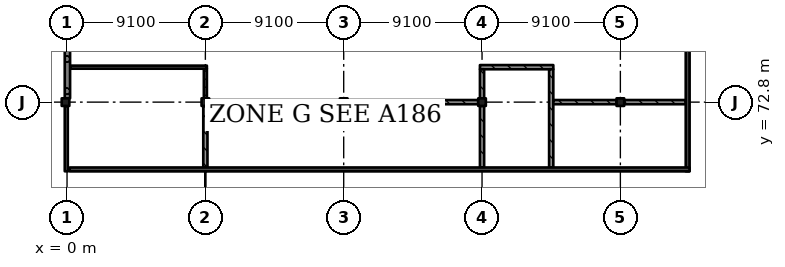
"""IFC4 building model, lengths in metres.
Left out: names, types, materials, properties, quantities, classifications, styles, units other than length and angle.
Written with IfcOpenShell. Run it as: python <this file> out.ifc"""

import sys

from ifc_helpers import new_model, si_unit, direction, frame, frame_2d, origin, origin_2d, place, context, subcontext, project, spatial, rectangle, extrude, element, fill, save


model = new_model("IFC4")
c1 = context("Model", 3, precision=1e-05, world=origin(), true_north=direction((0.0, 1.0)))
c2 = subcontext(c1, "Body", "Model", "MODEL_VIEW")
j1 = project(units=[si_unit("LENGTHUNIT", "METRE"), si_unit("PLANEANGLEUNIT", "RADIAN")], contexts=[c1])
p1 = place(None, origin())
s1 = spatial("IfcSite", under=j1, at=p1, CompositionType="ELEMENT")
p2 = place(p1, origin())
s2 = spatial("IfcBuilding", under=s1, at=p2, CompositionType="ELEMENT")
p3 = place(p2, frame((0.0, 0.0, 29.12)))
s3 = spatial("IfcBuildingStorey", under=s2, at=p3, CompositionType="ELEMENT", Elevation=29.12)
for number, where, z_axis, x_axis in (
    (1, (-0.1, 72.8, 0.0), (0.0, 0.0, 1.0), (1.0, 0.0, 0.0)),
    (2, (9.1, 72.8, 0.0), (0.0, 0.0, 1.0), (1.0, 0.0, 0.0)),
    (3, (18.2, 72.8, 0.0), (0.0, 0.0, 1.0), (1.0, 0.0, 0.0)),
    (4, (27.3, 72.8, 0.0), (0.0, 0.0, 1.0), (1.0, 0.0, 0.0)),
    (5, (36.4, 72.8, 0.0), (0.0, 0.0, 1.0), (1.0, 0.0, 0.0)),
):
    element("IfcColumn", number, at=place(p3, frame(where, z_axis=z_axis, x_axis=x_axis)), inside=s3, PredefinedType="COLUMN", context=c2, shape_type="SweptSolid", body=[
        extrude(rectangle(XDim=0.5, YDim=0.5, at=origin_2d()), origin(), (0.0, 0.0, 1.0), 4.55),
    ])
for number, where, z_axis, x_axis in (
    (6, (40.825, 68.25, 0.0), (0.0, 0.0, 1.0), (0.0, 1.0, 0.0)),
    (7, (40.95, 68.375, 0.0), (0.0, 0.0, 1.0), (-1.0, 0.0, 0.0)),
):
    element("IfcWall", number, at=place(p3, frame(where, z_axis=z_axis, x_axis=x_axis)), inside=s3, PredefinedType="SHEAR", context=c2, shape_type="SweptSolid", body=[
        extrude(rectangle(XDim=40.775, YDim=0.25, at=frame_2d((20.387, 0.0))), origin(), (0.0, 0.0, 1.0), 4.55),
    ])
p4 = place(p3, frame((0.025, 81.65, 0.0), z_axis=(0.0, 0.0, 1.0), x_axis=(0.0, -1.0, 0.0)))
e8 = element("IfcWall", 8, at=p4, inside=s3, PredefinedType="SOLIDWALL", context=c2, shape_type="SweptSolid", body=[
    extrude(rectangle(XDim=8.6, YDim=0.35, at=frame_2d((4.3, 0.0))), origin(), (0.0, 0.0, 1.0), 4.5),
])
p5 = place(p3, frame((-0.05, 72.55, 0.0), z_axis=(0.0, 0.0, 1.0), x_axis=(0.0, -1.0, 0.0)))
e9 = element("IfcWall", 9, at=p5, inside=s3, PredefinedType="SOLIDWALL", context=c2, shape_type="SweptSolid", body=[
    extrude(rectangle(XDim=4.3, YDim=0.2, at=frame_2d((2.15, 0.0))), origin(), (0.0, 0.0, 1.0), 4.5),
])
p6 = place(p5, frame((0.65, 0.0, 0.6)))
e10 = element("IfcOpeningElement", 10, at=p6, cuts=e9, PredefinedType="OPENING", context=c2, shape_type="SweptSolid", body=[
    extrude(rectangle(XDim=3.0, YDim=3.0, at=frame_2d((1.5, 1.5))), frame((0.0, 0.11, 0.0), z_axis=(0.0, -1.0, 0.0), x_axis=(1.0, 0.0, 0.0)), (0.0, 0.0, 1.0), 0.22),
])
p7 = place(p3, frame((9.1, 68.5, 0.0), z_axis=(0.0, 0.0, 1.0), x_axis=(0.0, 1.0, 0.0)))
e11 = element("IfcWall", 11, at=p7, inside=s3, PredefinedType="SOLIDWALL", context=c2, shape_type="SweptSolid", body=[
    extrude(rectangle(XDim=4.05, YDim=0.275, at=frame_2d((2.025, 0.0))), origin(), (0.0, 0.0, 1.0), 3.88),
])
p8 = place(p3, frame((9.1, 73.05, 0.0), z_axis=(0.0, 0.0, 1.0), x_axis=(0.0, 1.0, 0.0)))
e12 = element("IfcWall", 12, at=p8, inside=s3, PredefinedType="PARTITIONING", context=c2, shape_type="SweptSolid", body=[
    extrude(rectangle(XDim=1.95, YDim=0.2, at=frame_2d((0.975, 0.0))), origin(), (0.0, 0.0, 1.0), 3.88),
])
p9 = place(p3, frame((9.2, 75.1, 0.0), z_axis=(0.0, 0.0, 1.0), x_axis=(-1.0, 0.0, 0.0)))
e13 = element("IfcWall", 13, at=p9, inside=s3, PredefinedType="PARTITIONING", context=c2, shape_type="SweptSolid", body=[
    extrude(rectangle(XDim=9.0, YDim=0.2, at=frame_2d((4.5, 0.0))), origin(), (0.0, 0.0, 1.0), 3.88),
])
p10 = place(p9, frame((1.05, 0.0, 0.0)))
e14 = element("IfcOpeningElement", 14, at=p10, cuts=e13, PredefinedType="OPENING", context=c2, shape_type="SweptSolid", body=[
    extrude(rectangle(XDim=2.4, YDim=2.4, at=frame_2d((1.2, 1.2))), frame((0.0, 0.11, 0.0), z_axis=(0.0, -1.0, 0.0), x_axis=(1.0, 0.0, 0.0)), (0.0, 0.0, 1.0), 0.22),
])
p11 = place(p9, frame((5.55, 0.0, 0.0)))
e15 = element("IfcOpeningElement", 15, at=p11, cuts=e13, PredefinedType="OPENING", context=c2, shape_type="SweptSolid", body=[
    extrude(rectangle(XDim=2.4, YDim=2.4, at=frame_2d((1.2, 1.2))), frame((0.0, 0.11, 0.0), z_axis=(0.0, -1.0, 0.0), x_axis=(1.0, 0.0, 0.0)), (0.0, 0.0, 1.0), 0.22),
])
p12 = place(p3, frame((9.35, 72.8, 0.0), z_axis=(0.0, 0.0, 1.0), x_axis=(1.0, 0.0, 0.0)))
e16 = element("IfcWall", 16, at=p12, inside=s3, PredefinedType="SOLIDWALL", context=c2, shape_type="SweptSolid", body=[
    extrude(rectangle(XDim=8.6, YDim=0.275, at=frame_2d((4.3, 0.0))), origin(), (0.0, 0.0, 1.0), 3.88),
])
p13 = place(p3, frame((18.45, 72.8, 0.0), z_axis=(0.0, 0.0, 1.0), x_axis=(1.0, 0.0, 0.0)))
e17 = element("IfcWall", 17, at=p13, inside=s3, PredefinedType="SOLIDWALL", context=c2, shape_type="SweptSolid", body=[
    extrude(rectangle(XDim=8.6, YDim=0.275, at=frame_2d((4.3, 0.0))), origin(), (0.0, 0.0, 1.0), 3.88),
])
p14 = place(p13, frame((3.65, 0.0, 0.0)))
e18 = element("IfcOpeningElement", 18, at=p14, cuts=e17, PredefinedType="OPENING", context=c2, shape_type="SweptSolid", body=[
    extrude(rectangle(XDim=1.2, YDim=2.4, at=frame_2d((0.6, 1.2))), frame((0.0, 0.147, 0.0), z_axis=(0.0, -1.0, 0.0), x_axis=(1.0, 0.0, 0.0)), (0.0, 0.0, 1.0), 0.295),
])
p15 = place(p3, frame((27.163, 75.1, 0.0), z_axis=(0.0, 0.0, 1.0), x_axis=(1.0, 0.0, 0.0)))
e19 = element("IfcWall", 19, at=p15, inside=s3, PredefinedType="SOLIDWALL", context=c2, shape_type="SweptSolid", body=[
    extrude(rectangle(XDim=4.825, YDim=0.275, at=frame_2d((2.413, 0.0))), origin(), (0.0, 0.0, 1.0), 3.88),
])
p16 = place(p15, frame((1.85, 0.0, 0.0)))
e20 = element("IfcOpeningElement", 20, at=p16, cuts=e19, PredefinedType="OPENING", context=c2, shape_type="SweptSolid", body=[
    extrude(rectangle(XDim=1.2, YDim=2.4, at=frame_2d((0.6, 1.2))), frame((0.0, 0.147, 0.0), z_axis=(0.0, -1.0, 0.0), x_axis=(1.0, 0.0, 0.0)), (0.0, 0.0, 1.0), 0.295),
])
p17 = place(p3, frame((27.3, 72.55, 0.0), z_axis=(0.0, 0.0, 1.0), x_axis=(0.0, -1.0, 0.0)))
e21 = element("IfcWall", 21, at=p17, inside=s3, PredefinedType="SOLIDWALL", context=c2, shape_type="SweptSolid", body=[
    extrude(rectangle(XDim=4.05, YDim=0.275, at=frame_2d((2.025, 0.0))), origin(), (0.0, 0.0, 1.0), 3.88),
])
p18 = place(p3, frame((27.3, 73.05, 0.0), z_axis=(0.0, 0.0, 1.0), x_axis=(0.0, 1.0, 0.0)))
e22 = element("IfcWall", 22, at=p18, inside=s3, PredefinedType="SOLIDWALL", context=c2, shape_type="SweptSolid", body=[
    extrude(rectangle(XDim=1.912, YDim=0.275, at=frame_2d((0.956, 0.0))), origin(), (0.0, 0.0, 1.0), 3.88),
])
p19 = place(p3, frame((31.85, 68.5, 0.0), z_axis=(0.0, 0.0, 1.0), x_axis=(0.0, 1.0, 0.0)))
e23 = element("IfcWall", 23, at=p19, inside=s3, PredefinedType="SOLIDWALL", context=c2, shape_type="SweptSolid", body=[
    extrude(rectangle(XDim=6.462, YDim=0.275, at=frame_2d((3.231, 0.0))), origin(), (0.0, 0.0, 1.0), 3.88),
])
p20 = place(p3, frame((31.988, 72.8, 0.0), z_axis=(0.0, 0.0, 1.0), x_axis=(1.0, 0.0, 0.0)))
e24 = element("IfcWall", 24, at=p20, inside=s3, PredefinedType="SOLIDWALL", context=c2, shape_type="SweptSolid", body=[
    extrude(rectangle(XDim=4.162, YDim=0.275, at=frame_2d((2.081, 0.0))), origin(), (0.0, 0.0, 1.0), 3.88),
])
p21 = place(p20, frame((1.45, 0.0, 0.0)))
e25 = element("IfcOpeningElement", 25, at=p21, cuts=e24, PredefinedType="OPENING", context=c2, shape_type="SweptSolid", body=[
    extrude(rectangle(XDim=1.2, YDim=2.4, at=frame_2d((0.6, 1.2))), frame((0.0, 0.147, 0.0), z_axis=(0.0, -1.0, 0.0), x_axis=(1.0, 0.0, 0.0)), (0.0, 0.0, 1.0), 0.295),
])
p22 = place(p3, frame((36.65, 72.8, 0.0), z_axis=(0.0, 0.0, 1.0), x_axis=(1.0, 0.0, 0.0)))
e26 = element("IfcWall", 26, at=p22, inside=s3, PredefinedType="SOLIDWALL", context=c2, shape_type="SweptSolid", body=[
    extrude(rectangle(XDim=4.05, YDim=0.275, at=frame_2d((2.025, 0.0))), origin(), (0.0, 0.0, 1.0), 3.88),
])
p23 = place(p6, origin())
e27 = element("IfcWindow", 27, at=p23, inside=s3, PartitioningType="SINGLE_PANEL", PredefinedType="WINDOW", context=c2, shape_type="SweptSolid", body=[
    extrude(rectangle(XDim=3.0, YDim=3.0, at=frame_2d((1.5, 1.5))), frame((0.0, 0.03, 0.0), z_axis=(0.0, -1.0, 0.0), x_axis=(1.0, 0.0, 0.0)), (0.0, 0.0, 1.0), 0.06),
])
fill(e10, e27)
p24 = place(p14, origin())
e28 = element("IfcDoor", 28, at=p24, inside=s3, OperationType="SINGLE_SWING_LEFT", PredefinedType="DOOR", context=c2, shape_type="SweptSolid", body=[
    extrude(rectangle(XDim=1.2, YDim=2.4, at=frame_2d((0.6, 1.2))), frame((0.0, 0.025, 0.0), z_axis=(0.0, -1.0, 0.0), x_axis=(1.0, 0.0, 0.0)), (0.0, 0.0, 1.0), 0.05),
])
fill(e18, e28)
p25 = place(p16, origin())
e29 = element("IfcDoor", 29, at=p25, inside=s3, OperationType="SINGLE_SWING_RIGHT", PredefinedType="DOOR", context=c2, shape_type="SweptSolid", body=[
    extrude(rectangle(XDim=1.2, YDim=2.4, at=frame_2d((0.6, 1.2))), frame((0.0, 0.025, 0.0), z_axis=(0.0, -1.0, 0.0), x_axis=(1.0, 0.0, 0.0)), (0.0, 0.0, 1.0), 0.05),
])
fill(e20, e29)
p26 = place(p21, origin())
e30 = element("IfcDoor", 30, at=p26, inside=s3, OperationType="SINGLE_SWING_LEFT", PredefinedType="DOOR", context=c2, shape_type="SweptSolid", body=[
    extrude(rectangle(XDim=1.2, YDim=2.4, at=frame_2d((0.6, 1.2))), frame((0.0, 0.025, 0.0), z_axis=(0.0, -1.0, 0.0), x_axis=(1.0, 0.0, 0.0)), (0.0, 0.0, 1.0), 0.05),
])
fill(e25, e30)
p27 = place(p10, origin())
e31 = element("IfcDoor", 31, at=p27, inside=s3, OperationType="DOUBLE_DOOR_SINGLE_SWING", PredefinedType="DOOR", context=c2, shape_type="SweptSolid", body=[
    extrude(rectangle(XDim=2.4, YDim=2.4, at=frame_2d((1.2, 1.2))), frame((0.0, 0.025, 0.0), z_axis=(0.0, -1.0, 0.0), x_axis=(1.0, 0.0, 0.0)), (0.0, 0.0, 1.0), 0.05),
])
fill(e14, e31)
p28 = place(p11, origin())
e32 = element("IfcDoor", 32, at=p28, inside=s3, OperationType="DOUBLE_DOOR_SINGLE_SWING", PredefinedType="DOOR", context=c2, shape_type="SweptSolid", body=[
    extrude(rectangle(XDim=2.4, YDim=2.4, at=frame_2d((1.2, 1.2))), frame((0.0, 0.025, 0.0), z_axis=(0.0, -1.0, 0.0), x_axis=(1.0, 0.0, 0.0)), (0.0, 0.0, 1.0), 0.05),
])
fill(e15, e32)
save(model, sys.argv[1])
